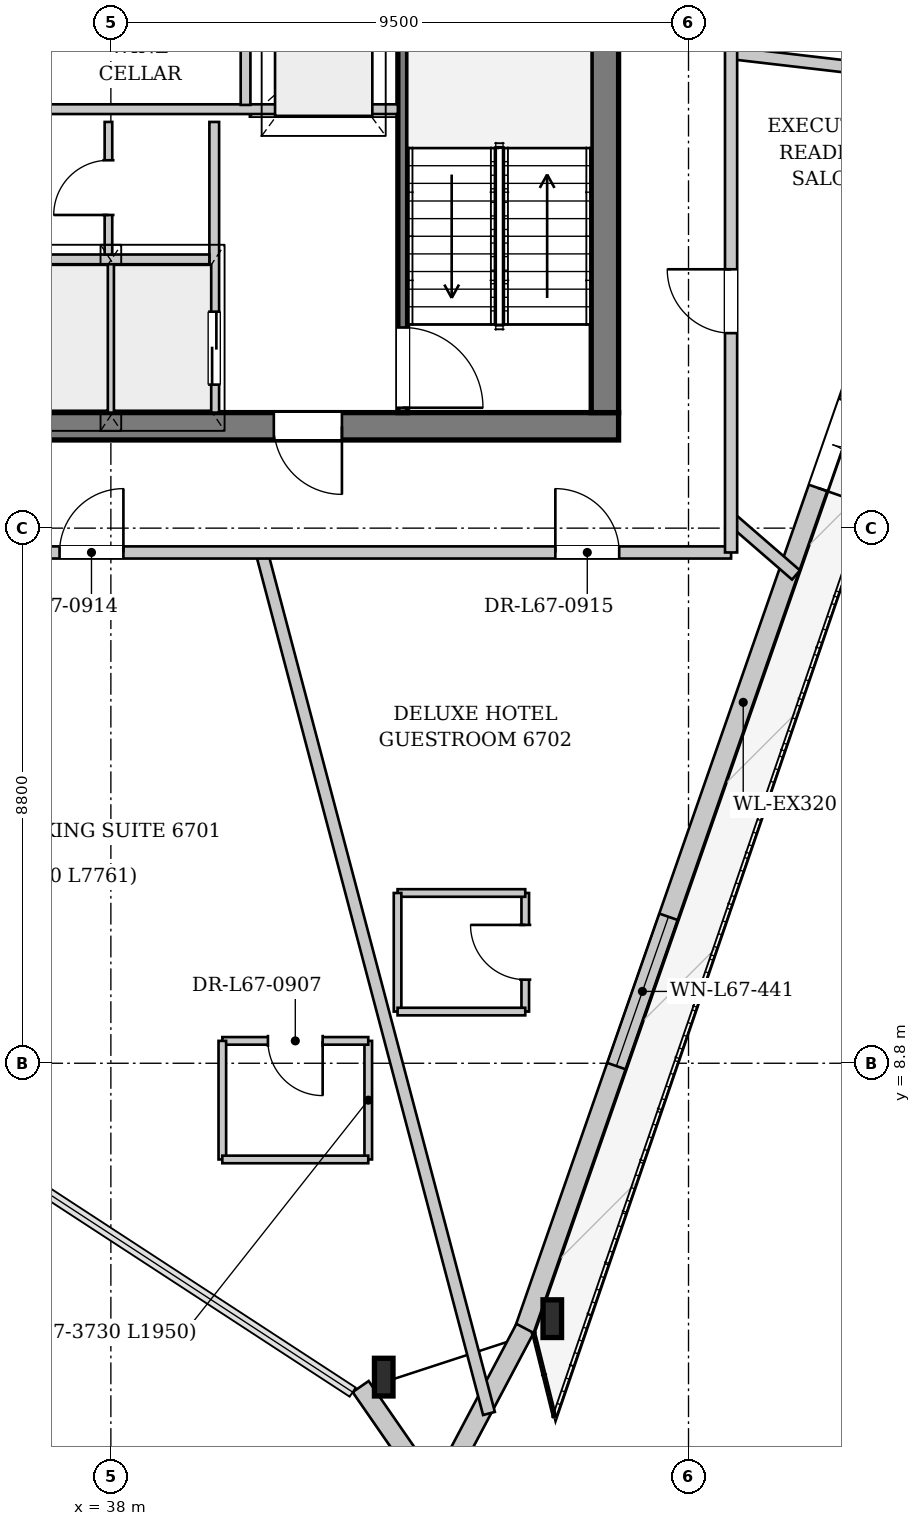
"""IFC4 building model, lengths in metres.
Left out: names, types, materials, properties, quantities, classifications, styles, units other than length and angle.
Written with IfcOpenShell. Run it as: python <this file> out.ifc"""

import sys

from ifc_helpers import new_model, si_unit, direction, frame, frame_2d, origin, origin_2d, place, context, subcontext, project, spatial, rectangle, i_section, extrude, source, transform, mapped, element, fill, save


model = new_model("IFC4")
c1 = context("Model", 3, precision=1e-05, world=origin(), true_north=direction((0.0, 1.0)))
c2 = subcontext(c1, "Body", "Model", "MODEL_VIEW")
j1 = project(units=[si_unit("LENGTHUNIT", "METRE"), si_unit("PLANEANGLEUNIT", "RADIAN")], contexts=[c1])
p1 = place(None, origin())
s1 = spatial("IfcSite", under=j1, at=p1, CompositionType="ELEMENT")
p2 = place(p1, origin())
s2 = spatial("IfcBuilding", under=s1, at=p2, CompositionType="ELEMENT")
p3 = place(p2, frame((0.0, 0.0, 252.5)))
s3 = spatial("IfcBuildingStorey", under=s2, at=p3, CompositionType="ELEMENT", Elevation=252.5)
m1 = source(origin(), c2, "Body", "SweptSolid", [
    extrude(i_section(OverallWidth=0.305, OverallDepth=0.62, WebThickness=0.021, FlangeThickness=0.04, at=origin_2d()), origin(), (0.0, 0.0, 1.0), 3.618),
])
p4 = place(p3, frame((41.976, 3.392, 0.0), z_axis=(0.282567518432, 0.136121013776, 0.949540239872), x_axis=(-0.433996754877, 0.900914433649, 0.0)))
e1 = element("IfcColumn", 1, at=p4, inside=s3, PredefinedType="COLUMN", context=c2, shape_type="MappedRepresentation", body=[
    mapped(m1, transform((0.0, 0.0, 0.0), x_axis=(1.0, 0.0, 0.0), y_axis=(0.0, 1.0, 0.0), z_axis=(0.0, 0.0, 1.0), scale=1.0)),
])
m2 = source(origin(), c2, "Body", "SweptSolid", [
    extrude(i_section(OverallWidth=0.305, OverallDepth=0.62, WebThickness=0.021, FlangeThickness=0.04, at=origin_2d()), origin(), (0.0, 0.0, 1.0), 3.521),
])
p5 = place(p3, frame((44.953, 4.365, 0.0), z_axis=(0.174187178706, 0.133344723189, 0.975642358435), x_axis=(-0.607860680587, 0.794043697158, 0.0)))
e2 = element("IfcColumn", 2, at=p5, inside=s3, PredefinedType="COLUMN", context=c2, shape_type="MappedRepresentation", body=[
    mapped(m2, transform((0.0, 0.0, 0.0), x_axis=(1.0, 0.0, 0.0), y_axis=(0.0, 1.0, 0.0), z_axis=(0.0, 0.0, 1.0), scale=1.0)),
])
p6 = place(p3, frame((52.264, 25.817, 0.0), z_axis=(0.0, 0.0, 1.0), x_axis=(-0.329283040193, -0.944231263749, 0.0)))
e3 = element("IfcWall", 3, at=p6, inside=s3, PredefinedType="SOLIDWALL", context=c2, shape_type="SweptSolid", body=[
    extrude(rectangle(XDim=22.663, YDim=0.32, at=frame_2d((11.332, 0.0))), origin(), (0.0, 0.0, 1.0), 2.872),
])
p7 = place(p6, frame((6.502, 0.0, 0.0)))
e4 = element("IfcOpeningElement", 4, at=p7, cuts=e3, PredefinedType="OPENING", context=c2, shape_type="SweptSolid", body=[
    extrude(rectangle(XDim=1.5, YDim=2.3, at=frame_2d((0.75, 1.15))), frame((0.0, 0.17, 0.0), z_axis=(0.0, -1.0, 0.0), x_axis=(1.0, 0.0, 0.0)), (0.0, 0.0, 1.0), 0.34),
])
p8 = place(p6, frame((15.471, 0.0, 0.402)))
e5 = element("IfcOpeningElement", 5, at=p8, cuts=e3, PredefinedType="OPENING", context=c2, shape_type="SweptSolid", body=[
    extrude(rectangle(XDim=2.6, YDim=2.35, at=frame_2d((1.3, 1.175))), frame((0.0, 0.17, 0.0), z_axis=(0.0, -1.0, 0.0), x_axis=(1.0, 0.0, 0.0)), (0.0, 0.0, 1.0), 0.34),
])
p9 = place(p3, frame((44.812, 4.44, 0.0), z_axis=(0.0, 0.0, 1.0), x_axis=(-0.467628956956, -0.883924860277, 0.0)))
e6 = element("IfcWall", 6, at=p9, inside=s3, PredefinedType="SOLIDWALL", context=c2, shape_type="SweptSolid", body=[
    extrude(rectangle(XDim=3.382, YDim=0.32, at=frame_2d((1.691, 0.0))), origin(), (0.0, 0.0, 1.0), 2.872),
])
p10 = place(p3, frame((43.503, 1.467, 0.0), z_axis=(0.0, 0.0, 1.0), x_axis=(-0.569023575379, 0.822321208934, 0.0)))
e7 = element("IfcWall", 7, at=p10, inside=s3, PredefinedType="SOLIDWALL", context=c2, shape_type="SweptSolid", body=[
    extrude(rectangle(XDim=2.452, YDim=0.32, at=frame_2d((1.226, 0.0))), origin(), (0.0, 0.0, 1.0), 2.872),
])
p11 = place(p3, frame((46.35, 19.275, 0.0), z_axis=(0.0, 0.0, 1.0), x_axis=(-1.0, 0.0, 0.0)))
e8 = element("IfcWall", 8, at=p11, inside=s3, PredefinedType="SHEAR", context=c2, shape_type="SweptSolid", body=[
    extrude(rectangle(XDim=16.7, YDim=0.45, at=frame_2d((8.35, 0.0))), origin(), (0.0, 0.0, 1.0), 3.38),
])
p12 = place(p11, frame((4.55, 0.0, 0.0)))
e9 = element("IfcOpeningElement", 9, at=p12, cuts=e8, PredefinedType="OPENING", context=c2, shape_type="SweptSolid", body=[
    extrude(rectangle(XDim=1.12, YDim=2.25, at=frame_2d((0.56, 1.125))), frame((0.0, 0.235, 0.0), z_axis=(0.0, -1.0, 0.0), x_axis=(1.0, 0.0, 0.0)), (0.0, 0.0, 1.0), 0.47),
])
p13 = place(p11, frame((11.05, 0.0, 0.0)))
e10 = element("IfcOpeningElement", 10, at=p13, cuts=e8, PredefinedType="OPENING", context=c2, shape_type="SweptSolid", body=[
    extrude(rectangle(XDim=1.12, YDim=2.25, at=frame_2d((0.56, 1.125))), frame((0.0, 0.235, 0.0), z_axis=(0.0, -1.0, 0.0), x_axis=(1.0, 0.0, 0.0)), (0.0, 0.0, 1.0), 0.47),
])
p14 = place(p3, frame((46.125, 33.7, 0.0), z_axis=(0.0, 0.0, 1.0), x_axis=(0.0, -1.0, 0.0)))
e11 = element("IfcWall", 11, at=p14, inside=s3, PredefinedType="SHEAR", context=c2, shape_type="SweptSolid", body=[
    extrude(rectangle(XDim=14.2, YDim=0.45, at=frame_2d((7.1, 0.0))), origin(), (0.0, 0.0, 1.0), 3.38),
])
p15 = place(p14, frame((5.18, 0.0, 0.0)))
e12 = element("IfcOpeningElement", 12, at=p15, cuts=e11, PredefinedType="OPENING", context=c2, shape_type="SweptSolid", body=[
    extrude(rectangle(XDim=1.6, YDim=2.2, at=frame_2d((0.8, 1.1))), frame((0.0, 0.235, 0.0), z_axis=(0.0, -1.0, 0.0), x_axis=(1.0, 0.0, 0.0)), (0.0, 0.0, 1.0), 0.47),
])
p16 = place(p14, frame((2.05, 0.0, 0.0)))
e13 = element("IfcOpeningElement", 13, at=p16, cuts=e11, PredefinedType="OPENING", context=c2, shape_type="SweptSolid", body=[
    extrude(rectangle(XDim=0.95, YDim=2.1, at=frame_2d((0.475, 1.05))), frame((0.0, 0.235, 0.0), z_axis=(0.0, -1.0, 0.0), x_axis=(1.0, 0.0, 0.0)), (0.0, 0.0, 1.0), 0.47),
])
p17 = place(p3, frame((42.8, 26.96, 0.0), z_axis=(0.0, 0.0, 1.0), x_axis=(0.0, -1.0, 0.0)))
e14 = element("IfcWall", 14, at=p17, inside=s3, PredefinedType="PARTITIONING", context=c2, shape_type="SweptSolid", body=[
    extrude(rectangle(XDim=7.46, YDim=0.16, at=frame_2d((3.73, 0.0))), origin(), (0.0, 0.0, 1.0), 3.38),
])
p18 = place(p17, frame((6.06, 0.0, 0.0)))
e15 = element("IfcOpeningElement", 15, at=p18, cuts=e14, PredefinedType="OPENING", context=c2, shape_type="SweptSolid", body=[
    extrude(rectangle(XDim=1.32, YDim=2.2, at=frame_2d((0.66, 1.1))), frame((0.0, 0.09, 0.0), z_axis=(0.0, -1.0, 0.0), x_axis=(1.0, 0.0, 0.0)), (0.0, 0.0, 1.0), 0.18),
])
p19 = place(p3, frame((39.7, 24.28, 0.0), z_axis=(0.0, 0.0, 1.0), x_axis=(0.0, -1.0, 0.0)))
e16 = element("IfcWall", 16, at=p19, inside=s3, PredefinedType="PARTITIONING", context=c2, shape_type="SweptSolid", body=[
    extrude(rectangle(XDim=4.78, YDim=0.16, at=frame_2d((2.39, 0.0))), origin(), (0.0, 0.0, 1.0), 3.38),
])
p20 = place(p19, frame((3.12, 0.0, 0.0)))
e17 = element("IfcOpeningElement", 17, at=p20, cuts=e16, PredefinedType="OPENING", context=c2, shape_type="SweptSolid", body=[
    extrude(rectangle(XDim=1.2, YDim=2.2, at=frame_2d((0.6, 1.1))), frame((0.0, 0.09, 0.0), z_axis=(0.0, -1.0, 0.0), x_axis=(1.0, 0.0, 0.0)), (0.0, 0.0, 1.0), 0.18),
])
p21 = place(p3, frame((38.0, 19.5, 0.0), z_axis=(0.0, 0.0, 1.0), x_axis=(0.0, 1.0, 0.0)))
e18 = element("IfcWall", 18, at=p21, inside=s3, PredefinedType="PARTITIONING", context=c2, shape_type="SweptSolid", body=[
    extrude(rectangle(XDim=2.46, YDim=0.125, at=frame_2d((1.23, 0.0))), origin(), (0.0, 0.0, 1.0), 3.38),
])
p22 = place(p3, frame((36.38, 22.02, 0.0), z_axis=(0.0, 0.0, 1.0), x_axis=(1.0, 0.0, 0.0)))
e19 = element("IfcWall", 19, at=p22, inside=s3, PredefinedType="PARTITIONING", context=c2, shape_type="SweptSolid", body=[
    extrude(rectangle(XDim=3.24, YDim=0.16, at=frame_2d((1.62, 0.0))), origin(), (0.0, 0.0, 1.0), 3.38),
])
p23 = place(p3, frame((33.28, 24.49, 0.0), z_axis=(0.0, 0.0, 1.0), x_axis=(1.0, 0.0, 0.0)))
e20 = element("IfcWall", 20, at=p23, inside=s3, PredefinedType="PARTITIONING", context=c2, shape_type="SweptSolid", body=[
    extrude(rectangle(XDim=9.44, YDim=0.16, at=frame_2d((4.72, 0.0))), origin(), (0.0, 0.0, 1.0), 3.38),
])
p24 = place(p3, frame((37.96, 22.1, 0.0), z_axis=(0.0, 0.0, 1.0), x_axis=(0.0, 1.0, 0.0)))
e21 = element("IfcWall", 21, at=p24, inside=s3, PredefinedType="PARTITIONING", context=c2, shape_type="SweptSolid", body=[
    extrude(rectangle(XDim=2.18, YDim=0.125, at=frame_2d((1.09, 0.0))), origin(), (0.0, 0.0, 1.0), 3.38),
])
p25 = place(p24, frame((0.65, 0.0, 0.0)))
e22 = element("IfcOpeningElement", 22, at=p25, cuts=e21, PredefinedType="OPENING", context=c2, shape_type="SweptSolid", body=[
    extrude(rectangle(XDim=0.9, YDim=2.1, at=frame_2d((0.45, 1.05))), frame((0.0, 0.073, 0.0), z_axis=(0.0, -1.0, 0.0), x_axis=(1.0, 0.0, 0.0)), (0.0, 0.0, 1.0), 0.145),
])
p26 = place(p3, frame((40.215, 24.56, 0.0), z_axis=(0.0, 0.0, 1.0), x_axis=(0.0, 1.0, 0.0)))
e23 = element("IfcWall", 23, at=p26, inside=s3, PredefinedType="PARTITIONING", context=c2, shape_type="SweptSolid", body=[
    extrude(rectangle(XDim=2.31, YDim=0.16, at=frame_2d((1.155, 0.0))), origin(), (0.0, 0.0, 1.0), 3.38),
])
p27 = place(p3, frame((40.481, 17.2, 0.0), z_axis=(0.0, 0.0, 1.0), x_axis=(0.255204698794, -0.96688704703, 0.0)))
e24 = element("IfcWall", 24, at=p27, inside=s3, PredefinedType="PARTITIONING", context=c2, shape_type="SweptSolid", body=[
    extrude(rectangle(XDim=14.644, YDim=0.2, at=frame_2d((7.322, 0.0))), origin(), (0.0, 0.0, 1.0), 3.38),
])
p28 = place(p3, frame((48.2, 17.756, 0.0), z_axis=(0.0, 0.0, 1.0), x_axis=(0.755500982585, -0.655147514162, 0.0)))
e25 = element("IfcWall", 25, at=p28, inside=s3, PredefinedType="PARTITIONING", context=c2, shape_type="SweptSolid", body=[
    extrude(rectangle(XDim=1.414, YDim=0.2, at=frame_2d((0.707, 0.0))), origin(), (0.0, 0.0, 1.0), 3.38),
])
p29 = place(p3, frame((48.2, 25.412, 0.0), z_axis=(0.0, 0.0, 1.0), x_axis=(0.993283151491, -0.115709035791, 0.0)))
e26 = element("IfcWall", 26, at=p29, inside=s3, PredefinedType="PARTITIONING", context=c2, shape_type="SweptSolid", body=[
    extrude(rectangle(XDim=3.929, YDim=0.2, at=frame_2d((1.964, 0.0))), origin(), (0.0, 0.0, 1.0), 3.38),
])
p30 = place(p3, frame((42.233, 7.218, 0.0), z_axis=(0.0, 0.0, 1.0), x_axis=(0.0, 1.0, 0.0)))
e27 = element("IfcWall", 27, at=p30, inside=s3, PredefinedType="PARTITIONING", context=c2, shape_type="SweptSolid", body=[
    extrude(rectangle(XDim=1.95, YDim=0.125, at=frame_2d((0.975, 0.0))), origin(), (0.0, 0.0, 1.0), 3.055),
])
p31 = place(p3, frame((42.233, 9.168, 0.0), z_axis=(0.0, 0.0, 1.0), x_axis=(-1.0, 0.0, 0.0)))
e28 = element("IfcWall", 28, at=p31, inside=s3, PredefinedType="PARTITIONING", context=c2, shape_type="SweptSolid", body=[
    extrude(rectangle(XDim=2.4, YDim=0.125, at=frame_2d((1.2, 0.0))), origin(), (0.0, 0.0, 1.0), 3.38),
])
p32 = place(p31, frame((0.75, 0.0, 0.0)))
e29 = element("IfcOpeningElement", 29, at=p32, cuts=e28, PredefinedType="OPENING", context=c2, shape_type="SweptSolid", body=[
    extrude(rectangle(XDim=0.9, YDim=2.1, at=frame_2d((0.45, 1.05))), frame((0.0, 0.073, 0.0), z_axis=(0.0, -1.0, 0.0), x_axis=(1.0, 0.0, 0.0)), (0.0, 0.0, 1.0), 0.145),
])
p33 = place(p3, frame((39.833, 9.168, 0.0), z_axis=(0.0, 0.0, 1.0), x_axis=(0.0, -1.0, 0.0)))
e30 = element("IfcWall", 30, at=p33, inside=s3, PredefinedType="PARTITIONING", context=c2, shape_type="SweptSolid", body=[
    extrude(rectangle(XDim=1.95, YDim=0.125, at=frame_2d((0.975, 0.0))), origin(), (0.0, 0.0, 1.0), 3.38),
])
p34 = place(p3, frame((39.833, 7.218, 0.0), z_axis=(0.0, 0.0, 1.0), x_axis=(1.0, 0.0, 0.0)))
e31 = element("IfcWall", 31, at=p34, inside=s3, PredefinedType="PARTITIONING", context=c2, shape_type="SweptSolid", body=[
    extrude(rectangle(XDim=2.4, YDim=0.125, at=frame_2d((1.2, 0.0))), origin(), (0.0, 0.0, 1.0), 3.38),
])
p35 = place(p3, frame((44.815, 9.65, 0.0), z_axis=(0.0, 0.0, 1.0), x_axis=(0.0, 1.0, 0.0)))
e32 = element("IfcWall", 32, at=p35, inside=s3, PredefinedType="PARTITIONING", context=c2, shape_type="SweptSolid", body=[
    extrude(rectangle(XDim=1.95, YDim=0.125, at=frame_2d((0.975, 0.0))), origin(), (0.0, 0.0, 1.0), 3.38),
])
p36 = place(p35, frame((0.525, 0.0, 0.0)))
e33 = element("IfcOpeningElement", 33, at=p36, cuts=e32, PredefinedType="OPENING", context=c2, shape_type="SweptSolid", body=[
    extrude(rectangle(XDim=0.9, YDim=2.1, at=frame_2d((0.45, 1.05))), frame((0.0, 0.073, 0.0), z_axis=(0.0, -1.0, 0.0), x_axis=(1.0, 0.0, 0.0)), (0.0, 0.0, 1.0), 0.145),
])
p37 = place(p3, frame((44.815, 11.6, 0.0), z_axis=(0.0, 0.0, 1.0), x_axis=(-1.0, 0.0, 0.0)))
e34 = element("IfcWall", 34, at=p37, inside=s3, PredefinedType="PARTITIONING", context=c2, shape_type="SweptSolid", body=[
    extrude(rectangle(XDim=2.1, YDim=0.125, at=frame_2d((1.05, 0.0))), origin(), (0.0, 0.0, 1.0), 3.38),
])
p38 = place(p3, frame((42.715, 11.6, 0.0), z_axis=(0.0, 0.0, 1.0), x_axis=(0.0, -1.0, 0.0)))
e35 = element("IfcWall", 35, at=p38, inside=s3, PredefinedType="PARTITIONING", context=c2, shape_type="SweptSolid", body=[
    extrude(rectangle(XDim=1.95, YDim=0.125, at=frame_2d((0.975, 0.0))), origin(), (0.0, 0.0, 1.0), 3.055),
])
p39 = place(p3, frame((42.715, 9.65, 0.0), z_axis=(0.0, 0.0, 1.0), x_axis=(1.0, 0.0, 0.0)))
e36 = element("IfcWall", 36, at=p39, inside=s3, PredefinedType="PARTITIONING", context=c2, shape_type="SweptSolid", body=[
    extrude(rectangle(XDim=2.1, YDim=0.125, at=frame_2d((1.05, 0.0))), origin(), (0.0, 0.0, 1.0), 3.38),
])
p40 = place(p3, frame((27.8, 17.2, 0.0), z_axis=(0.0, 0.0, 1.0), x_axis=(1.0, 0.0, 0.0)))
e37 = element("IfcWall", 37, at=p40, inside=s3, PredefinedType="PARTITIONING", context=c2, shape_type="SweptSolid", body=[
    extrude(rectangle(XDim=20.4, YDim=0.2, at=frame_2d((10.2, 0.0))), origin(), (0.0, 0.0, 1.0), 3.38),
])
p41 = place(p40, frame((9.356, 0.0, 0.0)))
e38 = element("IfcOpeningElement", 38, at=p41, cuts=e37, PredefinedType="OPENING", context=c2, shape_type="SweptSolid", body=[
    extrude(rectangle(XDim=1.05, YDim=2.2, at=frame_2d((0.525, 1.1))), frame((0.0, 0.11, 0.0), z_axis=(0.0, -1.0, 0.0), x_axis=(1.0, 0.0, 0.0)), (0.0, 0.0, 1.0), 0.22),
])
p42 = place(p40, frame((17.51, 0.0, 0.0)))
e39 = element("IfcOpeningElement", 39, at=p42, cuts=e37, PredefinedType="OPENING", context=c2, shape_type="SweptSolid", body=[
    extrude(rectangle(XDim=1.05, YDim=2.2, at=frame_2d((0.525, 1.1))), frame((0.0, 0.11, 0.0), z_axis=(0.0, -1.0, 0.0), x_axis=(1.0, 0.0, 0.0)), (0.0, 0.0, 1.0), 0.22),
])
p43 = place(p40, frame((0.412, 0.0, 0.0)))
e40 = element("IfcOpeningElement", 40, at=p43, cuts=e37, PredefinedType="OPENING", context=c2, shape_type="SweptSolid", body=[
    extrude(rectangle(XDim=1.05, YDim=2.2, at=frame_2d((0.525, 1.1))), frame((0.0, 0.11, 0.0), z_axis=(0.0, -1.0, 0.0), x_axis=(1.0, 0.0, 0.0)), (0.0, 0.0, 1.0), 0.22),
])
p44 = place(p3, frame((48.2, 17.2, 0.0), z_axis=(0.0, 0.0, 1.0), x_axis=(0.0, 1.0, 0.0)))
e41 = element("IfcWall", 41, at=p44, inside=s3, PredefinedType="PARTITIONING", context=c2, shape_type="SweptSolid", body=[
    extrude(rectangle(XDim=18.8, YDim=0.2, at=frame_2d((9.4, 0.0))), origin(), (0.0, 0.0, 1.0), 3.065),
])
p45 = place(p44, frame((3.607, 0.0, 0.0)))
e42 = element("IfcOpeningElement", 42, at=p45, cuts=e41, PredefinedType="OPENING", context=c2, shape_type="SweptSolid", body=[
    extrude(rectangle(XDim=1.05, YDim=2.2, at=frame_2d((0.525, 1.1))), frame((0.0, 0.11, 0.0), z_axis=(0.0, -1.0, 0.0), x_axis=(1.0, 0.0, 0.0)), (0.0, 0.0, 1.0), 0.22),
])
p46 = place(p44, frame((10.359, 0.0, 0.0)))
e43 = element("IfcOpeningElement", 43, at=p46, cuts=e41, PredefinedType="OPENING", context=c2, shape_type="SweptSolid", body=[
    extrude(rectangle(XDim=1.05, YDim=2.2, at=frame_2d((0.525, 1.1))), frame((0.0, 0.11, 0.0), z_axis=(0.0, -1.0, 0.0), x_axis=(1.0, 0.0, 0.0)), (0.0, 0.0, 1.0), 0.22),
])
m3 = source(origin(), c2, "Body", "SweptSolid", [
    extrude(rectangle(XDim=1.5, YDim=2.3, at=frame_2d((0.75, 1.15))), frame((0.0, 0.025, 0.0), z_axis=(0.0, -1.0, 0.0), x_axis=(1.0, 0.0, 0.0)), (0.0, 0.0, 1.0), 0.05),
])
p47 = place(p7, origin())
e44 = element("IfcDoor", 44, at=p47, inside=s3, OperationType="DOUBLE_DOOR_SINGLE_SWING", PredefinedType="DOOR", context=c2, shape_type="MappedRepresentation", body=[
    mapped(m3, transform((0.0, 0.0, 0.0), x_axis=(1.0, 0.0, 0.0), y_axis=(0.0, 1.0, 0.0), z_axis=(0.0, 0.0, 1.0), scale=1.0)),
])
fill(e4, e44)
m4 = source(origin(), c2, "Body", "SweptSolid", [
    extrude(rectangle(XDim=2.6, YDim=2.35, at=frame_2d((1.3, 1.175))), frame((0.0, 0.03, 0.0), z_axis=(0.0, -1.0, 0.0), x_axis=(1.0, 0.0, 0.0)), (0.0, 0.0, 1.0), 0.06),
])
p48 = place(p8, origin())
e45 = element("IfcWindow", 45, at=p48, inside=s3, PartitioningType="SINGLE_PANEL", PredefinedType="WINDOW", context=c2, shape_type="MappedRepresentation", body=[
    mapped(m4, transform((0.0, 0.0, 0.0), x_axis=(1.0, 0.0, 0.0), y_axis=(0.0, 1.0, 0.0), z_axis=(0.0, 0.0, 1.0), scale=1.0)),
])
fill(e5, e45)
m5 = source(origin(), c2, "Body", "SweptSolid", [
    extrude(rectangle(XDim=1.12, YDim=2.25, at=frame_2d((0.56, 1.125))), frame((0.0, 0.025, 0.0), z_axis=(0.0, -1.0, 0.0), x_axis=(1.0, 0.0, 0.0)), (0.0, 0.0, 1.0), 0.05),
])
p49 = place(p12, origin())
e46 = element("IfcDoor", 46, at=p49, inside=s3, OperationType="SINGLE_SWING_LEFT", PredefinedType="DOOR", context=c2, shape_type="MappedRepresentation", body=[
    mapped(m5, transform((0.0, 0.0, 0.0), x_axis=(1.0, 0.0, 0.0), y_axis=(0.0, 1.0, 0.0), z_axis=(0.0, 0.0, 1.0), scale=1.0)),
])
fill(e9, e46)
m6 = source(origin(), c2, "Body", "SweptSolid", [
    extrude(rectangle(XDim=1.32, YDim=2.2, at=frame_2d((0.66, 1.1))), frame((0.0, 0.025, 0.0), z_axis=(0.0, -1.0, 0.0), x_axis=(1.0, 0.0, 0.0)), (0.0, 0.0, 1.0), 0.05),
])
p50 = place(p18, origin())
e47 = element("IfcDoor", 47, at=p50, inside=s3, OperationType="SINGLE_SWING_RIGHT", PredefinedType="DOOR", context=c2, shape_type="MappedRepresentation", body=[
    mapped(m6, transform((0.0, 0.0, 0.0), x_axis=(1.0, 0.0, 0.0), y_axis=(0.0, 1.0, 0.0), z_axis=(0.0, 0.0, 1.0), scale=1.0)),
])
fill(e15, e47)
m7 = source(origin(), c2, "Body", "SweptSolid", [
    extrude(rectangle(XDim=0.9, YDim=2.1, at=frame_2d((0.45, 1.05))), frame((0.0, 0.025, 0.0), z_axis=(0.0, -1.0, 0.0), x_axis=(1.0, 0.0, 0.0)), (0.0, 0.0, 1.0), 0.05),
])
p51 = place(p25, origin())
e48 = element("IfcDoor", 48, at=p51, inside=s3, OperationType="SINGLE_SWING_LEFT", PredefinedType="DOOR", context=c2, shape_type="MappedRepresentation", body=[
    mapped(m7, transform((0.0, 0.0, 0.0), x_axis=(1.0, 0.0, 0.0), y_axis=(0.0, 1.0, 0.0), z_axis=(0.0, 0.0, 1.0), scale=1.0)),
])
fill(e22, e48)
m8 = source(origin(), c2, "Body", "SweptSolid", [
    extrude(rectangle(XDim=1.2, YDim=2.2, at=frame_2d((0.6, 1.1))), frame((0.0, 0.025, 0.0), z_axis=(0.0, -1.0, 0.0), x_axis=(1.0, 0.0, 0.0)), (0.0, 0.0, 1.0), 0.05),
])
p52 = place(p20, origin())
e49 = element("IfcDoor", 49, at=p52, inside=s3, OperationType="DOUBLE_DOOR_SLIDING", PredefinedType="DOOR", context=c2, shape_type="MappedRepresentation", body=[
    mapped(m8, transform((0.0, 0.0, 0.0), x_axis=(1.0, 0.0, 0.0), y_axis=(0.0, 1.0, 0.0), z_axis=(0.0, 0.0, 1.0), scale=1.0)),
])
fill(e17, e49)
p53 = place(p32, origin())
e50 = element("IfcDoor", 50, at=p53, inside=s3, OperationType="SINGLE_SWING_LEFT", PredefinedType="DOOR", context=c2, shape_type="MappedRepresentation", body=[
    mapped(m7, transform((0.0, 0.0, 0.0), x_axis=(1.0, 0.0, 0.0), y_axis=(0.0, 1.0, 0.0), z_axis=(0.0, 0.0, 1.0), scale=1.0)),
])
fill(e29, e50)
p54 = place(p36, origin())
e51 = element("IfcDoor", 51, at=p54, inside=s3, OperationType="SINGLE_SWING_RIGHT", PredefinedType="DOOR", context=c2, shape_type="MappedRepresentation", body=[
    mapped(m7, transform((0.0, 0.0, 0.0), x_axis=(1.0, 0.0, 0.0), y_axis=(0.0, 1.0, 0.0), z_axis=(0.0, 0.0, 1.0), scale=1.0)),
])
fill(e33, e51)
m9 = source(origin(), c2, "Body", "SweptSolid", [
    extrude(rectangle(XDim=1.05, YDim=2.2, at=frame_2d((0.525, 1.1))), frame((0.0, 0.025, 0.0), z_axis=(0.0, -1.0, 0.0), x_axis=(1.0, 0.0, 0.0)), (0.0, 0.0, 1.0), 0.05),
])
p55 = place(p41, origin())
e52 = element("IfcDoor", 52, at=p55, inside=s3, OperationType="SINGLE_SWING_RIGHT", PredefinedType="DOOR", context=c2, shape_type="MappedRepresentation", body=[
    mapped(m9, transform((0.0, 0.0, 0.0), x_axis=(1.0, 0.0, 0.0), y_axis=(0.0, 1.0, 0.0), z_axis=(0.0, 0.0, 1.0), scale=1.0)),
])
fill(e38, e52)
p56 = place(p42, origin())
e53 = element("IfcDoor", 53, at=p56, inside=s3, OperationType="SINGLE_SWING_LEFT", PredefinedType="DOOR", context=c2, shape_type="MappedRepresentation", body=[
    mapped(m9, transform((0.0, 0.0, 0.0), x_axis=(1.0, 0.0, 0.0), y_axis=(0.0, 1.0, 0.0), z_axis=(0.0, 0.0, 1.0), scale=1.0)),
])
fill(e39, e53)
p57 = place(p45, origin())
e54 = element("IfcDoor", 54, at=p57, inside=s3, OperationType="SINGLE_SWING_RIGHT", PredefinedType="DOOR", context=c2, shape_type="MappedRepresentation", body=[
    mapped(m9, transform((0.0, 0.0, 0.0), x_axis=(1.0, 0.0, 0.0), y_axis=(0.0, 1.0, 0.0), z_axis=(0.0, 0.0, 1.0), scale=1.0)),
])
fill(e42, e54)
save(model, sys.argv[1])
